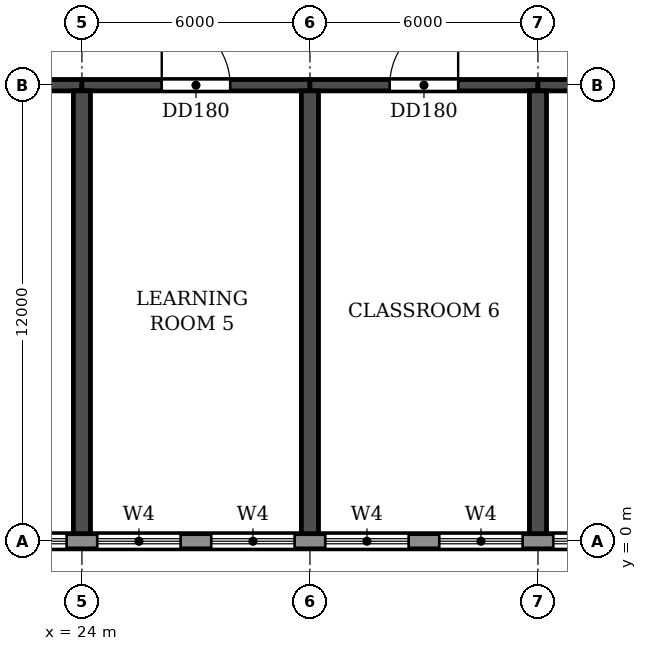
"""IFC4 building model, lengths in metres.
Left out: names, types, materials, properties, quantities, classifications, styles, units other than length and angle.
Written with IfcOpenShell. Run it as: python <this file> out.ifc"""

import sys

from ifc_helpers import new_model, si_unit, direction, frame, frame_2d, origin, place, context, subcontext, project, spatial, rectangle, extrude, element, fill, save


model = new_model("IFC4")
c1 = context("Model", 3, precision=1e-05, world=origin(), true_north=direction((0.0, 1.0)))
c2 = subcontext(c1, "Body", "Model", "MODEL_VIEW")
j1 = project(units=[si_unit("LENGTHUNIT", "METRE"), si_unit("PLANEANGLEUNIT", "RADIAN")], contexts=[c1])
p1 = place(None, origin())
s1 = spatial("IfcSite", under=j1, at=p1, CompositionType="ELEMENT")
p2 = place(p1, origin())
s2 = spatial("IfcBuilding", under=s1, at=p2, CompositionType="ELEMENT")
p3 = place(p2, frame((0.0, 0.0, 15.0)))
s3 = spatial("IfcBuildingStorey", under=s2, at=p3, CompositionType="ELEMENT", Elevation=15.0)
for number, where, z_axis, x_axis in (
    (1, (24.0, 0.2, 0.0), (0.0, 0.0, 1.0), (0.0, 1.0, 0.0)),
    (2, (30.0, 0.2, 0.0), (0.0, 0.0, 1.0), (0.0, 1.0, 0.0)),
    (3, (36.0, 0.2, 0.0), (0.0, 0.0, 1.0), (0.0, 1.0, 0.0)),
):
    element("IfcWall", number, at=place(p3, frame(where, z_axis=z_axis, x_axis=x_axis)), inside=s3, PredefinedType="SHEAR", context=c2, shape_type="SweptSolid", body=[
        extrude(rectangle(XDim=11.65, YDim=0.45, at=frame_2d((5.825, 0.0))), origin(), (0.0, 0.0, 1.0), 3.92),
    ])
p4 = place(p3, frame((18.0, 12.0, 0.0), z_axis=(0.0, 0.0, 1.0), x_axis=(1.0, 0.0, 0.0)))
e4 = element("IfcWall", 4, at=p4, inside=s3, PredefinedType="SHEAR", context=c2, shape_type="SweptSolid", body=[
    extrude(rectangle(XDim=6.0, YDim=0.3, at=frame_2d((3.0, 0.0))), origin(), (0.0, 0.0, 1.0), 3.32),
])
p5 = place(p4, frame((2.1, 0.0, 0.0)))
e5 = element("IfcOpeningElement", 5, at=p5, cuts=e4, PredefinedType="OPENING", context=c2, shape_type="SweptSolid", body=[
    extrude(rectangle(XDim=1.8, YDim=2.1, at=frame_2d((0.9, 1.05))), frame((0.0, 0.16, 0.0), z_axis=(0.0, -1.0, 0.0), x_axis=(1.0, 0.0, 0.0)), (0.0, 0.0, 1.0), 0.32),
])
p6 = place(p3, frame((24.0, 12.0, 0.0), z_axis=(0.0, 0.0, 1.0), x_axis=(1.0, 0.0, 0.0)))
e6 = element("IfcWall", 6, at=p6, inside=s3, PredefinedType="SHEAR", context=c2, shape_type="SweptSolid", body=[
    extrude(rectangle(XDim=6.0, YDim=0.3, at=frame_2d((3.0, 0.0))), origin(), (0.0, 0.0, 1.0), 3.32),
])
p7 = place(p6, frame((2.1, 0.0, 0.0)))
e7 = element("IfcOpeningElement", 7, at=p7, cuts=e6, PredefinedType="OPENING", context=c2, shape_type="SweptSolid", body=[
    extrude(rectangle(XDim=1.8, YDim=2.1, at=frame_2d((0.9, 1.05))), frame((0.0, 0.16, 0.0), z_axis=(0.0, -1.0, 0.0), x_axis=(1.0, 0.0, 0.0)), (0.0, 0.0, 1.0), 0.32),
])
p8 = place(p3, frame((30.0, 12.0, 0.0), z_axis=(0.0, 0.0, 1.0), x_axis=(1.0, 0.0, 0.0)))
e8 = element("IfcWall", 8, at=p8, inside=s3, PredefinedType="SHEAR", context=c2, shape_type="SweptSolid", body=[
    extrude(rectangle(XDim=6.0, YDim=0.3, at=frame_2d((3.0, 0.0))), origin(), (0.0, 0.0, 1.0), 3.32),
])
p9 = place(p8, frame((2.1, 0.0, 0.0)))
e9 = element("IfcOpeningElement", 9, at=p9, cuts=e8, PredefinedType="OPENING", context=c2, shape_type="SweptSolid", body=[
    extrude(rectangle(XDim=1.8, YDim=2.1, at=frame_2d((0.9, 1.05))), frame((0.0, 0.16, 0.0), z_axis=(0.0, -1.0, 0.0), x_axis=(1.0, 0.0, 0.0)), (0.0, 0.0, 1.0), 0.32),
])
p10 = place(p3, frame((36.0, 12.0, 0.0), z_axis=(0.0, 0.0, 1.0), x_axis=(1.0, 0.0, 0.0)))
e10 = element("IfcWall", 10, at=p10, inside=s3, PredefinedType="SHEAR", context=c2, shape_type="SweptSolid", body=[
    extrude(rectangle(XDim=6.0, YDim=0.3, at=frame_2d((3.0, 0.0))), origin(), (0.0, 0.0, 1.0), 3.32),
])
p11 = place(p10, frame((2.1, 0.0, 0.0)))
e11 = element("IfcOpeningElement", 11, at=p11, cuts=e10, PredefinedType="OPENING", context=c2, shape_type="SweptSolid", body=[
    extrude(rectangle(XDim=1.8, YDim=2.1, at=frame_2d((0.9, 1.05))), frame((0.0, 0.16, 0.0), z_axis=(0.0, -1.0, 0.0), x_axis=(1.0, 0.0, 0.0)), (0.0, 0.0, 1.0), 0.32),
])
p12 = place(p3, frame((-3.0, 0.0, 0.0), z_axis=(0.0, 0.0, 1.0), x_axis=(1.0, 0.0, 0.0)))
e12 = element("IfcWall", 12, at=p12, inside=s3, PredefinedType="STANDARD", context=c2, shape_type="SweptSolid", body=[
    extrude(rectangle(XDim=108.0, YDim=0.4, at=frame_2d((54.0, 0.0))), origin(), (0.0, 0.0, 1.0), 3.92),
])
p13 = place(p12, frame((3.4, 0.0, 0.9)))
e13 = element("IfcOpeningElement", 13, at=p13, cuts=e12, PredefinedType="OPENING", context=c2, shape_type="SweptSolid", body=[
    extrude(rectangle(XDim=2.2, YDim=2.7, at=frame_2d((1.1, 1.35))), frame((0.0, 0.21, 0.0), z_axis=(0.0, -1.0, 0.0), x_axis=(1.0, 0.0, 0.0)), (0.0, 0.0, 1.0), 0.42),
])
p14 = place(p12, frame((6.4, 0.0, 0.9)))
e14 = element("IfcOpeningElement", 14, at=p14, cuts=e12, PredefinedType="OPENING", context=c2, shape_type="SweptSolid", body=[
    extrude(rectangle(XDim=2.2, YDim=2.7, at=frame_2d((1.1, 1.35))), frame((0.0, 0.21, 0.0), z_axis=(0.0, -1.0, 0.0), x_axis=(1.0, 0.0, 0.0)), (0.0, 0.0, 1.0), 0.42),
])
p15 = place(p12, frame((9.4, 0.0, 0.9)))
e15 = element("IfcOpeningElement", 15, at=p15, cuts=e12, PredefinedType="OPENING", context=c2, shape_type="SweptSolid", body=[
    extrude(rectangle(XDim=2.2, YDim=2.7, at=frame_2d((1.1, 1.35))), frame((0.0, 0.21, 0.0), z_axis=(0.0, -1.0, 0.0), x_axis=(1.0, 0.0, 0.0)), (0.0, 0.0, 1.0), 0.42),
])
p16 = place(p12, frame((12.4, 0.0, 0.9)))
e16 = element("IfcOpeningElement", 16, at=p16, cuts=e12, PredefinedType="OPENING", context=c2, shape_type="SweptSolid", body=[
    extrude(rectangle(XDim=2.2, YDim=2.7, at=frame_2d((1.1, 1.35))), frame((0.0, 0.21, 0.0), z_axis=(0.0, -1.0, 0.0), x_axis=(1.0, 0.0, 0.0)), (0.0, 0.0, 1.0), 0.42),
])
p17 = place(p12, frame((15.4, 0.0, 0.9)))
e17 = element("IfcOpeningElement", 17, at=p17, cuts=e12, PredefinedType="OPENING", context=c2, shape_type="SweptSolid", body=[
    extrude(rectangle(XDim=2.2, YDim=2.7, at=frame_2d((1.1, 1.35))), frame((0.0, 0.21, 0.0), z_axis=(0.0, -1.0, 0.0), x_axis=(1.0, 0.0, 0.0)), (0.0, 0.0, 1.0), 0.42),
])
p18 = place(p12, frame((18.4, 0.0, 0.9)))
e18 = element("IfcOpeningElement", 18, at=p18, cuts=e12, PredefinedType="OPENING", context=c2, shape_type="SweptSolid", body=[
    extrude(rectangle(XDim=2.2, YDim=2.7, at=frame_2d((1.1, 1.35))), frame((0.0, 0.21, 0.0), z_axis=(0.0, -1.0, 0.0), x_axis=(1.0, 0.0, 0.0)), (0.0, 0.0, 1.0), 0.42),
])
p19 = place(p12, frame((21.4, 0.0, 0.9)))
e19 = element("IfcOpeningElement", 19, at=p19, cuts=e12, PredefinedType="OPENING", context=c2, shape_type="SweptSolid", body=[
    extrude(rectangle(XDim=2.2, YDim=2.7, at=frame_2d((1.1, 1.35))), frame((0.0, 0.21, 0.0), z_axis=(0.0, -1.0, 0.0), x_axis=(1.0, 0.0, 0.0)), (0.0, 0.0, 1.0), 0.42),
])
p20 = place(p12, frame((24.4, 0.0, 0.9)))
e20 = element("IfcOpeningElement", 20, at=p20, cuts=e12, PredefinedType="OPENING", context=c2, shape_type="SweptSolid", body=[
    extrude(rectangle(XDim=2.2, YDim=2.7, at=frame_2d((1.1, 1.35))), frame((0.0, 0.21, 0.0), z_axis=(0.0, -1.0, 0.0), x_axis=(1.0, 0.0, 0.0)), (0.0, 0.0, 1.0), 0.42),
])
p21 = place(p12, frame((27.4, 0.0, 0.9)))
e21 = element("IfcOpeningElement", 21, at=p21, cuts=e12, PredefinedType="OPENING", context=c2, shape_type="SweptSolid", body=[
    extrude(rectangle(XDim=2.2, YDim=2.7, at=frame_2d((1.1, 1.35))), frame((0.0, 0.21, 0.0), z_axis=(0.0, -1.0, 0.0), x_axis=(1.0, 0.0, 0.0)), (0.0, 0.0, 1.0), 0.42),
])
p22 = place(p12, frame((30.4, 0.0, 0.9)))
e22 = element("IfcOpeningElement", 22, at=p22, cuts=e12, PredefinedType="OPENING", context=c2, shape_type="SweptSolid", body=[
    extrude(rectangle(XDim=2.2, YDim=2.7, at=frame_2d((1.1, 1.35))), frame((0.0, 0.21, 0.0), z_axis=(0.0, -1.0, 0.0), x_axis=(1.0, 0.0, 0.0)), (0.0, 0.0, 1.0), 0.42),
])
p23 = place(p12, frame((33.4, 0.0, 0.9)))
e23 = element("IfcOpeningElement", 23, at=p23, cuts=e12, PredefinedType="OPENING", context=c2, shape_type="SweptSolid", body=[
    extrude(rectangle(XDim=2.2, YDim=2.7, at=frame_2d((1.1, 1.35))), frame((0.0, 0.21, 0.0), z_axis=(0.0, -1.0, 0.0), x_axis=(1.0, 0.0, 0.0)), (0.0, 0.0, 1.0), 0.42),
])
p24 = place(p12, frame((36.4, 0.0, 0.9)))
e24 = element("IfcOpeningElement", 24, at=p24, cuts=e12, PredefinedType="OPENING", context=c2, shape_type="SweptSolid", body=[
    extrude(rectangle(XDim=2.2, YDim=2.7, at=frame_2d((1.1, 1.35))), frame((0.0, 0.21, 0.0), z_axis=(0.0, -1.0, 0.0), x_axis=(1.0, 0.0, 0.0)), (0.0, 0.0, 1.0), 0.42),
])
p25 = place(p12, frame((39.4, 0.0, 0.9)))
e25 = element("IfcOpeningElement", 25, at=p25, cuts=e12, PredefinedType="OPENING", context=c2, shape_type="SweptSolid", body=[
    extrude(rectangle(XDim=2.2, YDim=2.7, at=frame_2d((1.1, 1.35))), frame((0.0, 0.21, 0.0), z_axis=(0.0, -1.0, 0.0), x_axis=(1.0, 0.0, 0.0)), (0.0, 0.0, 1.0), 0.42),
])
p26 = place(p12, frame((42.4, 0.0, 0.9)))
e26 = element("IfcOpeningElement", 26, at=p26, cuts=e12, PredefinedType="OPENING", context=c2, shape_type="SweptSolid", body=[
    extrude(rectangle(XDim=2.2, YDim=2.7, at=frame_2d((1.1, 1.35))), frame((0.0, 0.21, 0.0), z_axis=(0.0, -1.0, 0.0), x_axis=(1.0, 0.0, 0.0)), (0.0, 0.0, 1.0), 0.42),
])
p27 = place(p12, frame((45.4, 0.0, 0.9)))
e27 = element("IfcOpeningElement", 27, at=p27, cuts=e12, PredefinedType="OPENING", context=c2, shape_type="SweptSolid", body=[
    extrude(rectangle(XDim=2.2, YDim=2.7, at=frame_2d((1.1, 1.35))), frame((0.0, 0.21, 0.0), z_axis=(0.0, -1.0, 0.0), x_axis=(1.0, 0.0, 0.0)), (0.0, 0.0, 1.0), 0.42),
])
p28 = place(p12, frame((48.4, 0.0, 0.9)))
e28 = element("IfcOpeningElement", 28, at=p28, cuts=e12, PredefinedType="OPENING", context=c2, shape_type="SweptSolid", body=[
    extrude(rectangle(XDim=2.2, YDim=2.7, at=frame_2d((1.1, 1.35))), frame((0.0, 0.21, 0.0), z_axis=(0.0, -1.0, 0.0), x_axis=(1.0, 0.0, 0.0)), (0.0, 0.0, 1.0), 0.42),
])
p29 = place(p12, frame((51.4, 0.0, 0.9)))
e29 = element("IfcOpeningElement", 29, at=p29, cuts=e12, PredefinedType="OPENING", context=c2, shape_type="SweptSolid", body=[
    extrude(rectangle(XDim=2.2, YDim=2.7, at=frame_2d((1.1, 1.35))), frame((0.0, 0.21, 0.0), z_axis=(0.0, -1.0, 0.0), x_axis=(1.0, 0.0, 0.0)), (0.0, 0.0, 1.0), 0.42),
])
p30 = place(p12, frame((54.4, 0.0, 0.9)))
e30 = element("IfcOpeningElement", 30, at=p30, cuts=e12, PredefinedType="OPENING", context=c2, shape_type="SweptSolid", body=[
    extrude(rectangle(XDim=2.2, YDim=2.7, at=frame_2d((1.1, 1.35))), frame((0.0, 0.21, 0.0), z_axis=(0.0, -1.0, 0.0), x_axis=(1.0, 0.0, 0.0)), (0.0, 0.0, 1.0), 0.42),
])
p31 = place(p12, frame((57.4, 0.0, 0.9)))
e31 = element("IfcOpeningElement", 31, at=p31, cuts=e12, PredefinedType="OPENING", context=c2, shape_type="SweptSolid", body=[
    extrude(rectangle(XDim=2.2, YDim=2.7, at=frame_2d((1.1, 1.35))), frame((0.0, 0.21, 0.0), z_axis=(0.0, -1.0, 0.0), x_axis=(1.0, 0.0, 0.0)), (0.0, 0.0, 1.0), 0.42),
])
p32 = place(p12, frame((60.4, 0.0, 0.9)))
e32 = element("IfcOpeningElement", 32, at=p32, cuts=e12, PredefinedType="OPENING", context=c2, shape_type="SweptSolid", body=[
    extrude(rectangle(XDim=2.2, YDim=2.7, at=frame_2d((1.1, 1.35))), frame((0.0, 0.21, 0.0), z_axis=(0.0, -1.0, 0.0), x_axis=(1.0, 0.0, 0.0)), (0.0, 0.0, 1.0), 0.42),
])
p33 = place(p12, frame((63.4, 0.0, 0.9)))
e33 = element("IfcOpeningElement", 33, at=p33, cuts=e12, PredefinedType="OPENING", context=c2, shape_type="SweptSolid", body=[
    extrude(rectangle(XDim=2.2, YDim=2.7, at=frame_2d((1.1, 1.35))), frame((0.0, 0.21, 0.0), z_axis=(0.0, -1.0, 0.0), x_axis=(1.0, 0.0, 0.0)), (0.0, 0.0, 1.0), 0.42),
])
p34 = place(p12, frame((66.4, 0.0, 0.9)))
e34 = element("IfcOpeningElement", 34, at=p34, cuts=e12, PredefinedType="OPENING", context=c2, shape_type="SweptSolid", body=[
    extrude(rectangle(XDim=2.2, YDim=2.7, at=frame_2d((1.1, 1.35))), frame((0.0, 0.21, 0.0), z_axis=(0.0, -1.0, 0.0), x_axis=(1.0, 0.0, 0.0)), (0.0, 0.0, 1.0), 0.42),
])
p35 = place(p12, frame((69.4, 0.0, 0.9)))
e35 = element("IfcOpeningElement", 35, at=p35, cuts=e12, PredefinedType="OPENING", context=c2, shape_type="SweptSolid", body=[
    extrude(rectangle(XDim=2.2, YDim=2.7, at=frame_2d((1.1, 1.35))), frame((0.0, 0.21, 0.0), z_axis=(0.0, -1.0, 0.0), x_axis=(1.0, 0.0, 0.0)), (0.0, 0.0, 1.0), 0.42),
])
p36 = place(p12, frame((72.4, 0.0, 0.9)))
e36 = element("IfcOpeningElement", 36, at=p36, cuts=e12, PredefinedType="OPENING", context=c2, shape_type="SweptSolid", body=[
    extrude(rectangle(XDim=2.2, YDim=2.7, at=frame_2d((1.1, 1.35))), frame((0.0, 0.21, 0.0), z_axis=(0.0, -1.0, 0.0), x_axis=(1.0, 0.0, 0.0)), (0.0, 0.0, 1.0), 0.42),
])
p37 = place(p12, frame((75.4, 0.0, 0.9)))
e37 = element("IfcOpeningElement", 37, at=p37, cuts=e12, PredefinedType="OPENING", context=c2, shape_type="SweptSolid", body=[
    extrude(rectangle(XDim=2.2, YDim=2.7, at=frame_2d((1.1, 1.35))), frame((0.0, 0.21, 0.0), z_axis=(0.0, -1.0, 0.0), x_axis=(1.0, 0.0, 0.0)), (0.0, 0.0, 1.0), 0.42),
])
p38 = place(p12, frame((78.4, 0.0, 0.9)))
e38 = element("IfcOpeningElement", 38, at=p38, cuts=e12, PredefinedType="OPENING", context=c2, shape_type="SweptSolid", body=[
    extrude(rectangle(XDim=2.2, YDim=2.7, at=frame_2d((1.1, 1.35))), frame((0.0, 0.21, 0.0), z_axis=(0.0, -1.0, 0.0), x_axis=(1.0, 0.0, 0.0)), (0.0, 0.0, 1.0), 0.42),
])
p39 = place(p12, frame((81.4, 0.0, 0.9)))
e39 = element("IfcOpeningElement", 39, at=p39, cuts=e12, PredefinedType="OPENING", context=c2, shape_type="SweptSolid", body=[
    extrude(rectangle(XDim=2.2, YDim=2.7, at=frame_2d((1.1, 1.35))), frame((0.0, 0.21, 0.0), z_axis=(0.0, -1.0, 0.0), x_axis=(1.0, 0.0, 0.0)), (0.0, 0.0, 1.0), 0.42),
])
p40 = place(p12, frame((84.4, 0.0, 0.9)))
e40 = element("IfcOpeningElement", 40, at=p40, cuts=e12, PredefinedType="OPENING", context=c2, shape_type="SweptSolid", body=[
    extrude(rectangle(XDim=2.2, YDim=2.7, at=frame_2d((1.1, 1.35))), frame((0.0, 0.21, 0.0), z_axis=(0.0, -1.0, 0.0), x_axis=(1.0, 0.0, 0.0)), (0.0, 0.0, 1.0), 0.42),
])
p41 = place(p12, frame((87.4, 0.0, 0.9)))
e41 = element("IfcOpeningElement", 41, at=p41, cuts=e12, PredefinedType="OPENING", context=c2, shape_type="SweptSolid", body=[
    extrude(rectangle(XDim=2.2, YDim=2.7, at=frame_2d((1.1, 1.35))), frame((0.0, 0.21, 0.0), z_axis=(0.0, -1.0, 0.0), x_axis=(1.0, 0.0, 0.0)), (0.0, 0.0, 1.0), 0.42),
])
p42 = place(p12, frame((90.4, 0.0, 0.9)))
e42 = element("IfcOpeningElement", 42, at=p42, cuts=e12, PredefinedType="OPENING", context=c2, shape_type="SweptSolid", body=[
    extrude(rectangle(XDim=2.2, YDim=2.7, at=frame_2d((1.1, 1.35))), frame((0.0, 0.21, 0.0), z_axis=(0.0, -1.0, 0.0), x_axis=(1.0, 0.0, 0.0)), (0.0, 0.0, 1.0), 0.42),
])
p43 = place(p12, frame((93.4, 0.0, 0.9)))
e43 = element("IfcOpeningElement", 43, at=p43, cuts=e12, PredefinedType="OPENING", context=c2, shape_type="SweptSolid", body=[
    extrude(rectangle(XDim=2.2, YDim=2.7, at=frame_2d((1.1, 1.35))), frame((0.0, 0.21, 0.0), z_axis=(0.0, -1.0, 0.0), x_axis=(1.0, 0.0, 0.0)), (0.0, 0.0, 1.0), 0.42),
])
p44 = place(p12, frame((96.4, 0.0, 0.9)))
e44 = element("IfcOpeningElement", 44, at=p44, cuts=e12, PredefinedType="OPENING", context=c2, shape_type="SweptSolid", body=[
    extrude(rectangle(XDim=2.2, YDim=2.7, at=frame_2d((1.1, 1.35))), frame((0.0, 0.21, 0.0), z_axis=(0.0, -1.0, 0.0), x_axis=(1.0, 0.0, 0.0)), (0.0, 0.0, 1.0), 0.42),
])
p45 = place(p12, frame((99.4, 0.0, 0.9)))
e45 = element("IfcOpeningElement", 45, at=p45, cuts=e12, PredefinedType="OPENING", context=c2, shape_type="SweptSolid", body=[
    extrude(rectangle(XDim=2.2, YDim=2.7, at=frame_2d((1.1, 1.35))), frame((0.0, 0.21, 0.0), z_axis=(0.0, -1.0, 0.0), x_axis=(1.0, 0.0, 0.0)), (0.0, 0.0, 1.0), 0.42),
])
p46 = place(p12, frame((102.4, 0.0, 0.9)))
e46 = element("IfcOpeningElement", 46, at=p46, cuts=e12, PredefinedType="OPENING", context=c2, shape_type="SweptSolid", body=[
    extrude(rectangle(XDim=2.2, YDim=2.7, at=frame_2d((1.1, 1.35))), frame((0.0, 0.21, 0.0), z_axis=(0.0, -1.0, 0.0), x_axis=(1.0, 0.0, 0.0)), (0.0, 0.0, 1.0), 0.42),
])
p47 = place(p20, origin())
e47 = element("IfcWindow", 47, at=p47, inside=s3, PartitioningType="DOUBLE_PANEL_HORIZONTAL", PredefinedType="WINDOW", context=c2, shape_type="SweptSolid", body=[
    extrude(rectangle(XDim=2.2, YDim=2.7, at=frame_2d((1.1, 1.35))), frame((0.0, 0.03, 0.0), z_axis=(0.0, -1.0, 0.0), x_axis=(1.0, 0.0, 0.0)), (0.0, 0.0, 1.0), 0.06),
])
fill(e20, e47)
p48 = place(p21, origin())
e48 = element("IfcWindow", 48, at=p48, inside=s3, PartitioningType="DOUBLE_PANEL_HORIZONTAL", PredefinedType="WINDOW", context=c2, shape_type="SweptSolid", body=[
    extrude(rectangle(XDim=2.2, YDim=2.7, at=frame_2d((1.1, 1.35))), frame((0.0, 0.03, 0.0), z_axis=(0.0, -1.0, 0.0), x_axis=(1.0, 0.0, 0.0)), (0.0, 0.0, 1.0), 0.06),
])
fill(e21, e48)
p49 = place(p22, origin())
e49 = element("IfcWindow", 49, at=p49, inside=s3, PartitioningType="DOUBLE_PANEL_HORIZONTAL", PredefinedType="WINDOW", context=c2, shape_type="SweptSolid", body=[
    extrude(rectangle(XDim=2.2, YDim=2.7, at=frame_2d((1.1, 1.35))), frame((0.0, 0.03, 0.0), z_axis=(0.0, -1.0, 0.0), x_axis=(1.0, 0.0, 0.0)), (0.0, 0.0, 1.0), 0.06),
])
fill(e22, e49)
p50 = place(p23, origin())
e50 = element("IfcWindow", 50, at=p50, inside=s3, PartitioningType="DOUBLE_PANEL_HORIZONTAL", PredefinedType="WINDOW", context=c2, shape_type="SweptSolid", body=[
    extrude(rectangle(XDim=2.2, YDim=2.7, at=frame_2d((1.1, 1.35))), frame((0.0, 0.03, 0.0), z_axis=(0.0, -1.0, 0.0), x_axis=(1.0, 0.0, 0.0)), (0.0, 0.0, 1.0), 0.06),
])
fill(e23, e50)
p51 = place(p24, origin())
e51 = element("IfcWindow", 51, at=p51, inside=s3, PartitioningType="DOUBLE_PANEL_HORIZONTAL", PredefinedType="WINDOW", context=c2, shape_type="SweptSolid", body=[
    extrude(rectangle(XDim=2.2, YDim=2.7, at=frame_2d((1.1, 1.35))), frame((0.0, 0.03, 0.0), z_axis=(0.0, -1.0, 0.0), x_axis=(1.0, 0.0, 0.0)), (0.0, 0.0, 1.0), 0.06),
])
fill(e24, e51)
p52 = place(p25, origin())
e52 = element("IfcWindow", 52, at=p52, inside=s3, PartitioningType="DOUBLE_PANEL_HORIZONTAL", PredefinedType="WINDOW", context=c2, shape_type="SweptSolid", body=[
    extrude(rectangle(XDim=2.2, YDim=2.7, at=frame_2d((1.1, 1.35))), frame((0.0, 0.03, 0.0), z_axis=(0.0, -1.0, 0.0), x_axis=(1.0, 0.0, 0.0)), (0.0, 0.0, 1.0), 0.06),
])
fill(e25, e52)
p53 = place(p7, origin())
e53 = element("IfcDoor", 53, at=p53, inside=s3, OperationType="DOUBLE_DOOR_SINGLE_SWING", PredefinedType="DOOR", context=c2, shape_type="SweptSolid", body=[
    extrude(rectangle(XDim=1.8, YDim=2.1, at=frame_2d((0.9, 1.05))), frame((0.0, 0.025, 0.0), z_axis=(0.0, -1.0, 0.0), x_axis=(1.0, 0.0, 0.0)), (0.0, 0.0, 1.0), 0.05),
])
fill(e7, e53)
p54 = place(p9, origin())
e54 = element("IfcDoor", 54, at=p54, inside=s3, OperationType="DOUBLE_DOOR_SINGLE_SWING", PredefinedType="DOOR", context=c2, shape_type="SweptSolid", body=[
    extrude(rectangle(XDim=1.8, YDim=2.1, at=frame_2d((0.9, 1.05))), frame((0.0, 0.025, 0.0), z_axis=(0.0, -1.0, 0.0), x_axis=(1.0, 0.0, 0.0)), (0.0, 0.0, 1.0), 0.05),
])
fill(e9, e54)
save(model, sys.argv[1])
